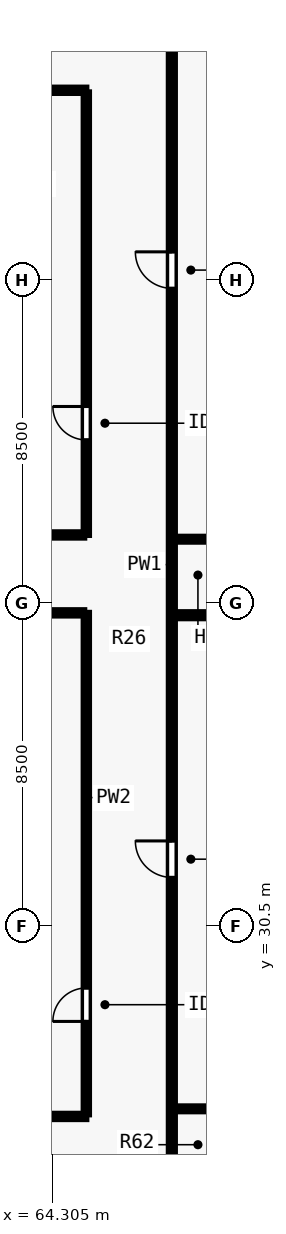
"""IFC4 building model, lengths in metres.
Left out: names, types, materials, properties, quantities, classifications, styles, units other than length and angle.
Written with IfcOpenShell. Run it as: python <this file> out.ifc"""

import sys

from ifc_helpers import new_model, si_unit, direction, frame, frame_2d, origin, place, context, subcontext, project, spatial, rectangle, extrude, element, fill, save


model = new_model("IFC4")
c1 = context("Model", 3, precision=1e-05, world=origin(), true_north=direction((0.0, 1.0)))
c2 = subcontext(c1, "Body", "Model", "MODEL_VIEW")
j1 = project(units=[si_unit("LENGTHUNIT", "METRE"), si_unit("PLANEANGLEUNIT", "RADIAN")], contexts=[c1])
p1 = place(None, origin())
s1 = spatial("IfcSite", under=j1, at=p1, CompositionType="ELEMENT")
p2 = place(p1, origin())
s2 = spatial("IfcBuilding", under=s1, at=p2, CompositionType="ELEMENT")
p3 = place(p2, frame((0.0, 0.0, 76.0)))
s3 = spatial("IfcBuildingStorey", under=s2, at=p3, CompositionType="ELEMENT", Elevation=76.0)
p4 = place(p3, frame((67.45, 23.315, 0.0), z_axis=(0.0, 0.0, 1.0), x_axis=(0.0, 1.0, 0.0)))
e1 = element("IfcWall", 1, at=p4, inside=s3, PredefinedType="PARTITIONING", context=c2, shape_type="SweptSolid", body=[
    extrude(rectangle(XDim=31.37, YDim=0.16, at=frame_2d((15.685, 0.0))), origin(), (0.0, 0.0, 1.0), 3.28),
])
p5 = place(p4, frame((8.474, 0.0, 0.0)))
e2 = element("IfcOpeningElement", 2, at=p5, cuts=e1, PredefinedType="OPENING", context=c2, shape_type="SweptSolid", body=[
    extrude(rectangle(XDim=0.96, YDim=2.15, at=frame_2d((0.48, 1.075))), frame((0.0, 0.09, 0.0), z_axis=(0.0, -1.0, 0.0), x_axis=(1.0, 0.0, 0.0)), (0.0, 0.0, 1.0), 0.18),
])
p6 = place(p4, frame((23.974, 0.0, 0.0)))
e3 = element("IfcOpeningElement", 3, at=p6, cuts=e1, PredefinedType="OPENING", context=c2, shape_type="SweptSolid", body=[
    extrude(rectangle(XDim=0.96, YDim=2.15, at=frame_2d((0.48, 1.075))), frame((0.0, 0.09, 0.0), z_axis=(0.0, -1.0, 0.0), x_axis=(1.0, 0.0, 0.0)), (0.0, 0.0, 1.0), 0.18),
])
p7 = place(p3, frame((38.8, 25.5, 0.0), z_axis=(0.0, 0.0, 1.0), x_axis=(1.0, 0.0, 0.0)))
e4 = element("IfcWall", 4, at=p7, inside=s3, PredefinedType="PARTITIONING", context=c2, shape_type="SweptSolid", body=[
    extrude(rectangle(XDim=26.4, YDim=0.14, at=frame_2d((13.2, 0.0))), origin(), (0.0, 0.0, 1.0), 3.28),
])
p8 = place(p7, frame((2.2, 0.0, 0.0)))
e5 = element("IfcOpeningElement", 5, at=p8, cuts=e4, PredefinedType="OPENING", context=c2, shape_type="SweptSolid", body=[
    extrude(rectangle(XDim=0.96, YDim=2.12, at=frame_2d((0.48, 1.06))), frame((0.0, 0.08, 0.0), z_axis=(0.0, -1.0, 0.0), x_axis=(1.0, 0.0, 0.0)), (0.0, 0.0, 1.0), 0.16),
])
p9 = place(p7, frame((15.2, 0.0, 0.0)))
e6 = element("IfcOpeningElement", 6, at=p9, cuts=e4, PredefinedType="OPENING", context=c2, shape_type="SweptSolid", body=[
    extrude(rectangle(XDim=0.96, YDim=2.12, at=frame_2d((0.48, 1.06))), frame((0.0, 0.08, 0.0), z_axis=(0.0, -1.0, 0.0), x_axis=(1.0, 0.0, 0.0)), (0.0, 0.0, 1.0), 0.16),
])
p10 = place(p3, frame((38.8, 52.5, 0.0), z_axis=(0.0, 0.0, 1.0), x_axis=(1.0, 0.0, 0.0)))
e7 = element("IfcWall", 7, at=p10, inside=s3, PredefinedType="PARTITIONING", context=c2, shape_type="SweptSolid", body=[
    extrude(rectangle(XDim=26.4, YDim=0.14, at=frame_2d((13.2, 0.0))), origin(), (0.0, 0.0, 1.0), 3.28),
])
p11 = place(p10, frame((3.2, 0.0, 0.0)))
e8 = element("IfcOpeningElement", 8, at=p11, cuts=e7, PredefinedType="OPENING", context=c2, shape_type="SweptSolid", body=[
    extrude(rectangle(XDim=0.96, YDim=2.12, at=frame_2d((0.48, 1.06))), frame((0.0, 0.08, 0.0), z_axis=(0.0, -1.0, 0.0), x_axis=(1.0, 0.0, 0.0)), (0.0, 0.0, 1.0), 0.16),
])
p12 = place(p10, frame((19.2, 0.0, 0.0)))
e9 = element("IfcOpeningElement", 9, at=p12, cuts=e7, PredefinedType="OPENING", context=c2, shape_type="SweptSolid", body=[
    extrude(rectangle(XDim=0.96, YDim=2.12, at=frame_2d((0.48, 1.06))), frame((0.0, 0.08, 0.0), z_axis=(0.0, -1.0, 0.0), x_axis=(1.0, 0.0, 0.0)), (0.0, 0.0, 1.0), 0.16),
])
p13 = place(p3, frame((65.2, 25.555, 0.0), z_axis=(0.0, 0.0, 1.0), x_axis=(0.0, 1.0, 0.0)))
e10 = element("IfcWall", 10, at=p13, inside=s3, PredefinedType="PARTITIONING", context=c2, shape_type="SweptSolid", body=[
    extrude(rectangle(XDim=13.195, YDim=0.14, at=frame_2d((6.598, 0.0))), origin(), (0.0, 0.0, 1.0), 3.28),
])
p14 = place(p13, frame((2.445, 0.0, 0.0)))
e11 = element("IfcOpeningElement", 11, at=p14, cuts=e10, PredefinedType="OPENING", context=c2, shape_type="SweptSolid", body=[
    extrude(rectangle(XDim=0.88, YDim=2.1, at=frame_2d((0.44, 1.05))), frame((0.0, 0.08, 0.0), z_axis=(0.0, -1.0, 0.0), x_axis=(1.0, 0.0, 0.0)), (0.0, 0.0, 1.0), 0.16),
])
p15 = place(p3, frame((65.2, 40.8, 0.0), z_axis=(0.0, 0.0, 1.0), x_axis=(0.0, 1.0, 0.0)))
e12 = element("IfcWall", 12, at=p15, inside=s3, PredefinedType="PARTITIONING", context=c2, shape_type="SweptSolid", body=[
    extrude(rectangle(XDim=11.645, YDim=0.14, at=frame_2d((5.823, 0.0))), origin(), (0.0, 0.0, 1.0), 3.28),
])
p16 = place(p15, frame((2.5, 0.0, 0.0)))
e13 = element("IfcOpeningElement", 13, at=p16, cuts=e12, PredefinedType="OPENING", context=c2, shape_type="SweptSolid", body=[
    extrude(rectangle(XDim=0.88, YDim=2.1, at=frame_2d((0.44, 1.05))), frame((0.0, 0.08, 0.0), z_axis=(0.0, -1.0, 0.0), x_axis=(1.0, 0.0, 0.0)), (0.0, 0.0, 1.0), 0.16),
])
for number, where, z_axis, x_axis in (
    (14, (60.76, 38.75, 0.0), (0.0, 0.0, 1.0), (1.0, 0.0, 0.0)),
    (15, (60.76, 40.8, 0.0), (0.0, 0.0, 1.0), (1.0, 0.0, 0.0)),
):
    element("IfcWall", number, at=place(p3, frame(where, z_axis=z_axis, x_axis=x_axis)), inside=s3, PredefinedType="PARTITIONING", context=c2, shape_type="SweptSolid", body=[
        extrude(rectangle(XDim=4.385, YDim=0.14, at=frame_2d((2.192, 0.0))), origin(), (0.0, 0.0, 1.0), 3.28),
    ])
p17 = place(p3, frame((67.515, 25.7, 0.0), z_axis=(0.0, 0.0, 1.0), x_axis=(1.0, 0.0, 0.0)))
e16 = element("IfcWall", 16, at=p17, inside=s3, PredefinedType="PLUMBINGWALL", context=c2, shape_type="SweptSolid", body=[
    extrude(rectangle(XDim=2.235, YDim=0.13, at=frame_2d((1.118, 0.0))), origin(), (0.0, 0.0, 1.0), 3.28),
])
p18 = place(p3, frame((67.515, 38.688, 0.0), z_axis=(0.0, 0.0, 1.0), x_axis=(1.0, 0.0, 0.0)))
e17 = element("IfcWall", 17, at=p18, inside=s3, PredefinedType="PARTITIONING", context=c2, shape_type="SweptSolid", body=[
    extrude(rectangle(XDim=9.64, YDim=0.16, at=frame_2d((4.82, 0.0))), origin(), (0.0, 0.0, 1.0), 3.28),
])
p19 = place(p3, frame((67.515, 40.688, 0.0), z_axis=(0.0, 0.0, 1.0), x_axis=(1.0, 0.0, 0.0)))
e18 = element("IfcWall", 18, at=p19, inside=s3, PredefinedType="PLUMBINGWALL", context=c2, shape_type="SweptSolid", body=[
    extrude(rectangle(XDim=2.235, YDim=0.13, at=frame_2d((1.118, 0.0))), origin(), (0.0, 0.0, 1.0), 3.28),
])
p20 = place(p14, origin())
e19 = element("IfcDoor", 19, at=p20, inside=s3, OperationType="SINGLE_SWING_LEFT", PredefinedType="DOOR", context=c2, shape_type="SweptSolid", body=[
    extrude(rectangle(XDim=0.88, YDim=2.1, at=frame_2d((0.44, 1.05))), frame((0.0, 0.025, 0.0), z_axis=(0.0, -1.0, 0.0), x_axis=(1.0, 0.0, 0.0)), (0.0, 0.0, 1.0), 0.05),
])
fill(e11, e19)
p21 = place(p16, origin())
e20 = element("IfcDoor", 20, at=p21, inside=s3, OperationType="SINGLE_SWING_RIGHT", PredefinedType="DOOR", context=c2, shape_type="SweptSolid", body=[
    extrude(rectangle(XDim=0.88, YDim=2.1, at=frame_2d((0.44, 1.05))), frame((0.0, 0.025, 0.0), z_axis=(0.0, -1.0, 0.0), x_axis=(1.0, 0.0, 0.0)), (0.0, 0.0, 1.0), 0.05),
])
fill(e13, e20)
p22 = place(p5, origin())
e21 = element("IfcDoor", 21, at=p22, inside=s3, OperationType="SINGLE_SWING_RIGHT", PredefinedType="DOOR", context=c2, shape_type="SweptSolid", body=[
    extrude(rectangle(XDim=0.96, YDim=2.15, at=frame_2d((0.48, 1.075))), frame((0.0, 0.025, 0.0), z_axis=(0.0, -1.0, 0.0), x_axis=(1.0, 0.0, 0.0)), (0.0, 0.0, 1.0), 0.05),
])
fill(e2, e21)
p23 = place(p6, origin())
e22 = element("IfcDoor", 22, at=p23, inside=s3, OperationType="SINGLE_SWING_RIGHT", PredefinedType="DOOR", context=c2, shape_type="SweptSolid", body=[
    extrude(rectangle(XDim=0.96, YDim=2.15, at=frame_2d((0.48, 1.075))), frame((0.0, 0.025, 0.0), z_axis=(0.0, -1.0, 0.0), x_axis=(1.0, 0.0, 0.0)), (0.0, 0.0, 1.0), 0.05),
])
fill(e3, e22)
save(model, sys.argv[1])
